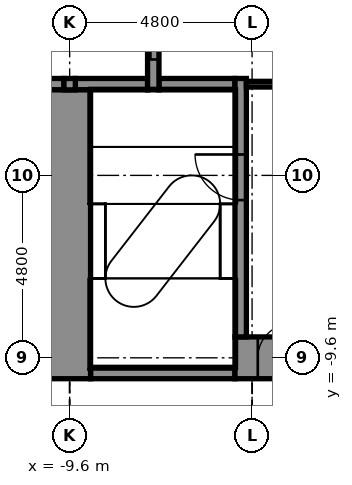
"""IFC4 building model, lengths in metres.
Left out: names, types, materials, properties, quantities, classifications, styles, units other than length and angle.
Written with IfcOpenShell. Run it as: python <this file> out.ifc"""

import sys

from ifc_helpers import new_model, si_unit, direction, frame, frame_2d, origin, place, context, subcontext, project, spatial, rectangle, extrude, element, fill, save


model = new_model("IFC4")
c1 = context("Model", 3, precision=1e-05, world=origin(), true_north=direction((0.0, 1.0)))
c2 = subcontext(c1, "Body", "Model", "MODEL_VIEW")
j1 = project(units=[si_unit("LENGTHUNIT", "METRE"), si_unit("PLANEANGLEUNIT", "RADIAN")], contexts=[c1])
p1 = place(None, origin())
s1 = spatial("IfcSite", under=j1, at=p1, CompositionType="ELEMENT")
p2 = place(p1, origin())
s2 = spatial("IfcBuilding", under=s1, at=p2, CompositionType="ELEMENT")
p3 = place(p2, frame((0.0, 0.0, 66.4)))
s3 = spatial("IfcBuildingStorey", under=s2, at=p3, CompositionType="ELEMENT", Elevation=66.4)
p4 = place(p3, frame((-9.05, -10.0, -0.3), z_axis=(0.0, 0.0, 1.0), x_axis=(1.0, 0.0, 0.0)))
e1 = element("IfcWall", 1, at=p4, inside=s3, PredefinedType="STANDARD", context=c2, shape_type="SweptSolid", body=[
    extrude(rectangle(XDim=3.8, YDim=0.3, at=frame_2d((1.9, 0.0))), origin(), (0.0, 0.0, 1.0), 5.5),
])
p5 = place(p3, frame((-5.25, -9.6, -0.3), z_axis=(0.0, 0.0, 1.0), x_axis=(1.0, 0.0, 0.0)))
e2 = element("IfcWall", 2, at=p5, inside=s3, PredefinedType="SHEAR", context=c2, shape_type="SweptSolid", body=[
    extrude(rectangle(XDim=10.2, YDim=1.1, at=frame_2d((5.1, 0.0))), origin(), (0.0, 0.0, 1.0), 5.5),
])
p6 = place(p5, frame((0.6, 0.0, 0.3)))
e3 = element("IfcOpeningElement", 3, at=p6, cuts=e2, PredefinedType="OPENING", context=c2, shape_type="SweptSolid", body=[
    extrude(rectangle(XDim=0.9, YDim=2.1, at=frame_2d((0.45, 1.05))), frame((0.0, 0.56, 0.0), z_axis=(0.0, -1.0, 0.0), x_axis=(1.0, 0.0, 0.0)), (0.0, 0.0, 1.0), 1.12),
])
p7 = place(p3, frame((-10.85, -2.4, -0.3), z_axis=(0.0, 0.0, 1.0), x_axis=(1.0, 0.0, 0.0)))
e4 = element("IfcWall", 4, at=p7, inside=s3, PredefinedType="STANDARD", context=c2, shape_type="SweptSolid", body=[
    extrude(rectangle(XDim=1.1, YDim=0.3, at=frame_2d((0.55, 0.0))), origin(), (0.0, 0.0, 1.0), 5.5),
])
p8 = place(p3, frame((-9.45, -2.4, -0.3), z_axis=(0.0, 0.0, 1.0), x_axis=(1.0, 0.0, 0.0)))
e5 = element("IfcWall", 5, at=p8, inside=s3, PredefinedType="STANDARD", context=c2, shape_type="SweptSolid", body=[
    extrude(rectangle(XDim=1.9, YDim=0.3, at=frame_2d((0.95, 0.0))), origin(), (0.0, 0.0, 1.0), 5.5),
])
p9 = place(p3, frame((-7.25, -2.4, -0.3), z_axis=(0.0, 0.0, 1.0), x_axis=(1.0, 0.0, 0.0)))
e6 = element("IfcWall", 6, at=p9, inside=s3, PredefinedType="STANDARD", context=c2, shape_type="SweptSolid", body=[
    extrude(rectangle(XDim=2.0, YDim=0.3, at=frame_2d((1.0, 0.0))), origin(), (0.0, 0.0, 1.0), 5.5),
])
p10 = place(p3, frame((-9.6, -10.15, -0.3), z_axis=(0.0, 0.0, 1.0), x_axis=(0.0, 1.0, 0.0)))
e7 = element("IfcWall", 7, at=p10, inside=s3, PredefinedType="SHEAR", context=c2, shape_type="SweptSolid", body=[
    extrude(rectangle(XDim=7.6, YDim=1.1, at=frame_2d((3.8, 0.0))), origin(), (0.0, 0.0, 1.0), 5.5),
])
p11 = place(p3, frame((-9.6, -2.55, -0.3), z_axis=(0.0, 0.0, 1.0), x_axis=(0.0, 1.0, 0.0)))
e8 = element("IfcWall", 8, at=p11, inside=s3, PredefinedType="STANDARD", context=c2, shape_type="SweptSolid", body=[
    extrude(rectangle(XDim=0.3, YDim=0.3, at=frame_2d((0.15, 0.0))), origin(), (0.0, 0.0, 1.0), 5.5),
])
p12 = place(p3, frame((-7.4, -2.55, -0.3), z_axis=(0.0, 0.0, 1.0), x_axis=(0.0, 1.0, 0.0)))
e9 = element("IfcWall", 9, at=p12, inside=s3, PredefinedType="STANDARD", context=c2, shape_type="SweptSolid", body=[
    extrude(rectangle(XDim=5.1, YDim=0.3, at=frame_2d((2.55, 0.0))), origin(), (0.0, 0.0, 1.0), 5.5),
])
p13 = place(p12, frame((0.8, 0.0, 0.3)))
e10 = element("IfcOpeningElement", 10, at=p13, cuts=e9, PredefinedType="OPENING", context=c2, shape_type="SweptSolid", body=[
    extrude(rectangle(XDim=1.1, YDim=2.1, at=frame_2d((0.55, 1.05))), frame((0.0, 0.16, 0.0), z_axis=(0.0, -1.0, 0.0), x_axis=(1.0, 0.0, 0.0)), (0.0, 0.0, 1.0), 0.32),
])
p14 = place(p12, frame((3.2, 0.0, 0.3)))
e11 = element("IfcOpeningElement", 11, at=p14, cuts=e9, PredefinedType="OPENING", context=c2, shape_type="SweptSolid", body=[
    extrude(rectangle(XDim=1.1, YDim=2.1, at=frame_2d((0.55, 1.05))), frame((0.0, 0.16, 0.0), z_axis=(0.0, -1.0, 0.0), x_axis=(1.0, 0.0, 0.0)), (0.0, 0.0, 1.0), 0.32),
])
p15 = place(p3, frame((-5.1, -9.05, -0.3), z_axis=(0.0, 0.0, 1.0), x_axis=(0.0, 1.0, 0.0)))
e12 = element("IfcWall", 12, at=p15, inside=s3, PredefinedType="STANDARD", context=c2, shape_type="SweptSolid", body=[
    extrude(rectangle(XDim=6.8, YDim=0.3, at=frame_2d((3.4, 0.0))), origin(), (0.0, 0.0, 1.0), 5.5),
])
p16 = place(p15, frame((3.6, 0.0, 0.3)))
e13 = element("IfcOpeningElement", 13, at=p16, cuts=e12, PredefinedType="OPENING", context=c2, shape_type="SweptSolid", body=[
    extrude(rectangle(XDim=1.2, YDim=2.1, at=frame_2d((0.6, 1.05))), frame((0.0, 0.16, 0.0), z_axis=(0.0, -1.0, 0.0), x_axis=(1.0, 0.0, 0.0)), (0.0, 0.0, 1.0), 0.32),
])
p17 = place(p3, frame((-4.95, -2.4, 0.0), z_axis=(0.0, 0.0, 1.0), x_axis=(1.0, 0.0, 0.0)))
e14 = element("IfcWall", 14, at=p17, inside=s3, PredefinedType="PARTITIONING", context=c2, shape_type="SweptSolid", body=[
    extrude(rectangle(XDim=1.2, YDim=0.15, at=frame_2d((0.6, 0.0))), origin(), (0.0, 0.0, 1.0), 5.2),
])
p18 = place(p13, origin())
e15 = element("IfcDoor", 15, at=p18, inside=s3, OperationType="DOUBLE_DOOR_SLIDING", PredefinedType="DOOR", context=c2, shape_type="SweptSolid", body=[
    extrude(rectangle(XDim=1.1, YDim=2.1, at=frame_2d((0.55, 1.05))), frame((0.0, 0.025, 0.0), z_axis=(0.0, -1.0, 0.0), x_axis=(1.0, 0.0, 0.0)), (0.0, 0.0, 1.0), 0.05),
])
fill(e10, e15)
p19 = place(p16, origin())
e16 = element("IfcDoor", 16, at=p19, inside=s3, OperationType="SINGLE_SWING_RIGHT", PredefinedType="DOOR", context=c2, shape_type="SweptSolid", body=[
    extrude(rectangle(XDim=1.2, YDim=2.1, at=frame_2d((0.6, 1.05))), frame((0.0, 0.025, 0.0), z_axis=(0.0, -1.0, 0.0), x_axis=(1.0, 0.0, 0.0)), (0.0, 0.0, 1.0), 0.05),
])
fill(e13, e16)
p20 = place(p6, origin())
e17 = element("IfcDoor", 17, at=p20, inside=s3, OperationType="SINGLE_SWING_RIGHT", PredefinedType="DOOR", context=c2, shape_type="SweptSolid", body=[
    extrude(rectangle(XDim=0.9, YDim=2.1, at=frame_2d((0.45, 1.05))), frame((0.0, 0.025, 0.0), z_axis=(0.0, -1.0, 0.0), x_axis=(1.0, 0.0, 0.0)), (0.0, 0.0, 1.0), 0.05),
])
fill(e3, e17)
save(model, sys.argv[1])
